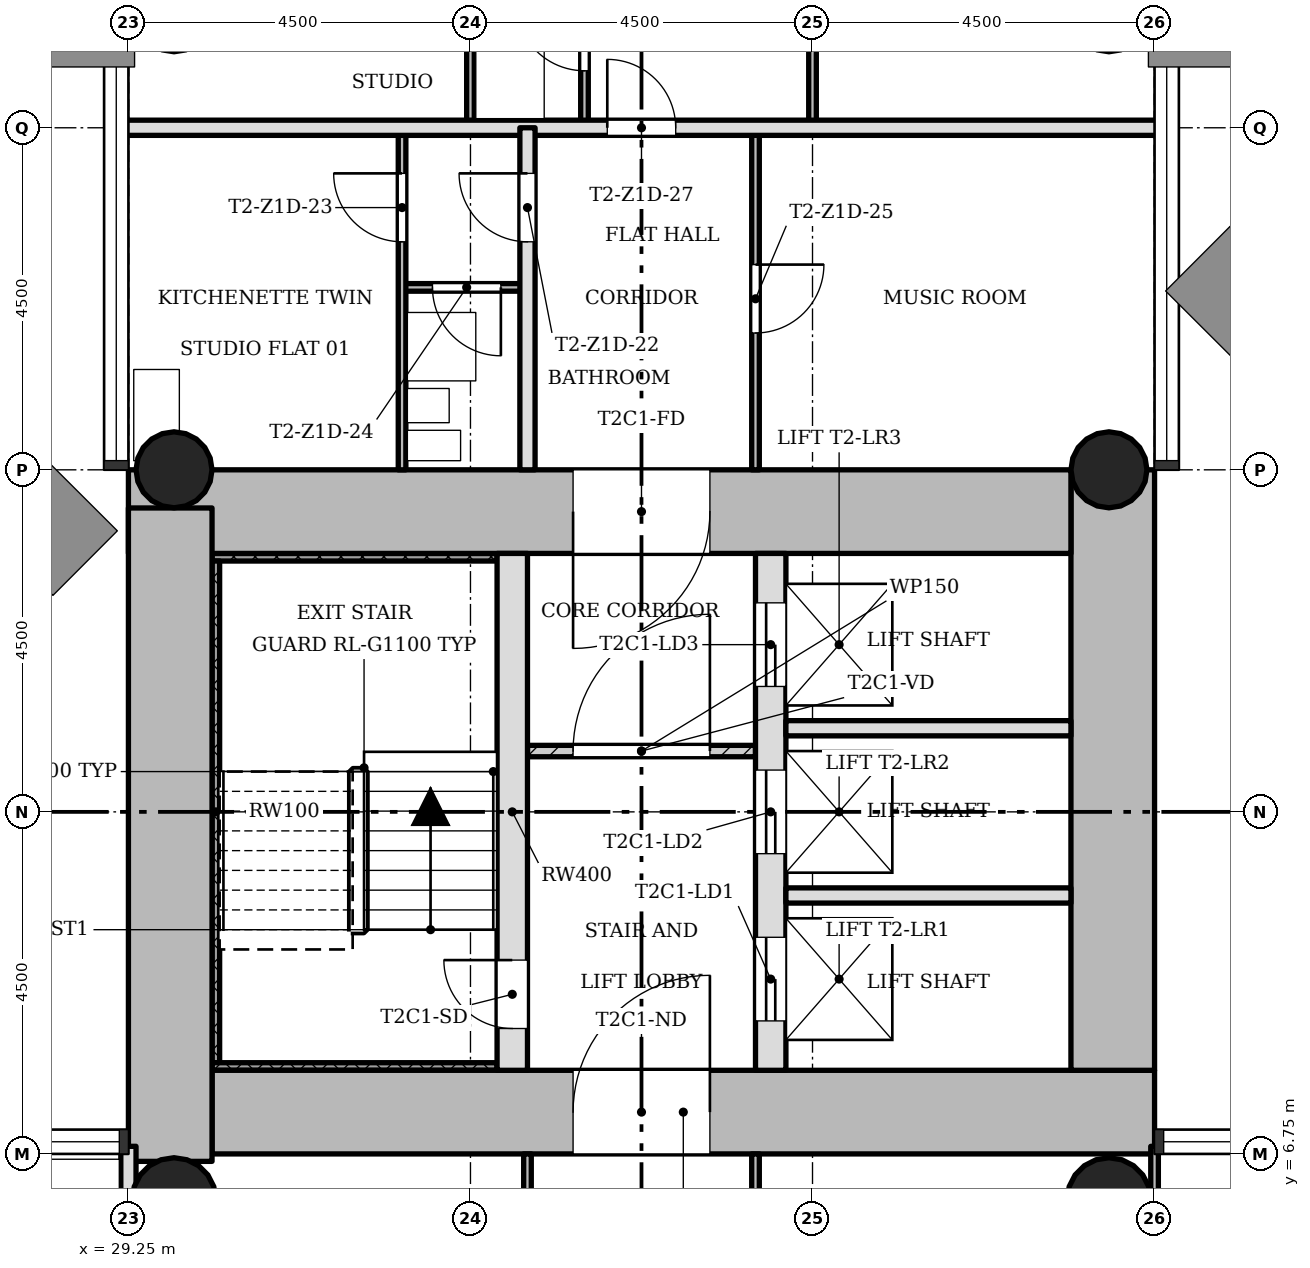
"""IFC4 building model, lengths in metres.
Left out: names, types, materials, properties, quantities, classifications, styles, units other than length and angle.
Written with IfcOpenShell. Run it as: python <this file> out.ifc"""

import sys

from ifc_helpers import new_model, si_unit, direction, frame, frame_2d, origin, origin_2d, place, context, subcontext, project, spatial, rectangle, hollow_circle, extrude, element, fill, save


model = new_model("IFC4")
c1 = context("Model", 3, precision=1e-05, world=origin(), true_north=direction((0.0, 1.0)))
c2 = subcontext(c1, "Body", "Model", "MODEL_VIEW")
j1 = project(units=[si_unit("LENGTHUNIT", "METRE"), si_unit("PLANEANGLEUNIT", "RADIAN")], contexts=[c1])
p1 = place(None, origin())
s1 = spatial("IfcSite", under=j1, at=p1, CompositionType="ELEMENT")
p2 = place(p1, origin())
s2 = spatial("IfcBuilding", under=s1, at=p2, CompositionType="ELEMENT")
p3 = place(p2, frame((0.0, 0.0, 58.5)))
s3 = spatial("IfcBuildingStorey", under=s2, at=p3, CompositionType="ELEMENT", Elevation=58.5)
p4 = place(p3, frame((30.35, 7.3, 0.0), z_axis=(0.0, 0.0, 1.0), x_axis=(1.0, 0.0, 0.0)))
e1 = element("IfcWall", 1, at=p4, inside=s3, PredefinedType="SHEAR", context=c2, shape_type="SweptSolid", body=[
    extrude(rectangle(XDim=12.4, YDim=1.1, at=frame_2d((6.2, 0.0))), origin(), (0.0, 0.0, 1.0), 3.4),
])
p5 = place(p4, frame((4.75, 0.0, 0.0)))
e2 = element("IfcOpeningElement", 2, at=p5, cuts=e1, PredefinedType="OPENING", context=c2, shape_type="SweptSolid", body=[
    extrude(rectangle(XDim=1.8, YDim=2.1, at=frame_2d((0.9, 1.05))), frame((0.0, 0.56, 0.0), z_axis=(0.0, -1.0, 0.0), x_axis=(1.0, 0.0, 0.0)), (0.0, 0.0, 1.0), 1.12),
])
p6 = place(p3, frame((42.2, 7.85, 0.0), z_axis=(0.0, 0.0, 1.0), x_axis=(0.0, 1.0, 0.0)))
e3 = element("IfcWall", 3, at=p6, inside=s3, PredefinedType="SHEAR", context=c2, shape_type="SweptSolid", body=[
    extrude(rectangle(XDim=7.9, YDim=1.1, at=frame_2d((3.95, 0.0))), origin(), (0.0, 0.0, 1.0), 3.4),
])
p7 = place(p3, frame((41.65, 15.2, 0.0), z_axis=(0.0, 0.0, 1.0), x_axis=(-1.0, 0.0, 0.0)))
e4 = element("IfcWall", 4, at=p7, inside=s3, PredefinedType="SHEAR", context=c2, shape_type="SweptSolid", body=[
    extrude(rectangle(XDim=12.4, YDim=1.1, at=frame_2d((6.2, 0.0))), origin(), (0.0, 0.0, 1.0), 3.4),
])
p8 = place(p7, frame((4.75, 0.0, 0.0)))
e5 = element("IfcOpeningElement", 5, at=p8, cuts=e4, PredefinedType="OPENING", context=c2, shape_type="SweptSolid", body=[
    extrude(rectangle(XDim=1.8, YDim=2.1, at=frame_2d((0.9, 1.05))), frame((0.0, 0.56, 0.0), z_axis=(0.0, -1.0, 0.0), x_axis=(1.0, 0.0, 0.0)), (0.0, 0.0, 1.0), 1.12),
])
p9 = place(p3, frame((29.8, 15.248, 0.0), z_axis=(0.0, 0.0, 1.0), x_axis=(0.0, -1.0, 0.0)))
e6 = element("IfcWall", 6, at=p9, inside=s3, PredefinedType="SHEAR", context=c2, shape_type="SweptSolid", body=[
    extrude(rectangle(XDim=8.596, YDim=1.1, at=frame_2d((4.298, 0.0))), origin(), (0.0, 0.0, 1.0), 3.4),
])
p10 = place(p3, frame((34.3, 7.85, 0.0), z_axis=(0.0, 0.0, 1.0), x_axis=(0.0, 1.0, 0.0)))
e7 = element("IfcWall", 7, at=p10, inside=s3, PredefinedType="SHEAR", context=c2, shape_type="SweptSolid", body=[
    extrude(rectangle(XDim=6.8, YDim=0.4, at=frame_2d((3.4, 0.0))), origin(), (0.0, 0.0, 1.0), 3.4),
])
p11 = place(p10, frame((0.55, 0.0, 0.0)))
e8 = element("IfcOpeningElement", 8, at=p11, cuts=e7, PredefinedType="OPENING", context=c2, shape_type="SweptSolid", body=[
    extrude(rectangle(XDim=0.9, YDim=2.1, at=frame_2d((0.45, 1.05))), frame((0.0, 0.21, 0.0), z_axis=(0.0, -1.0, 0.0), x_axis=(1.0, 0.0, 0.0)), (0.0, 0.0, 1.0), 0.42),
])
p12 = place(p3, frame((37.7, 7.85, 0.0), z_axis=(0.0, 0.0, 1.0), x_axis=(0.0, 1.0, 0.0)))
e9 = element("IfcWall", 9, at=p12, inside=s3, PredefinedType="SHEAR", context=c2, shape_type="SweptSolid", body=[
    extrude(rectangle(XDim=6.8, YDim=0.4, at=frame_2d((3.4, 0.0))), origin(), (0.0, 0.0, 1.0), 3.4),
])
p13 = place(p12, frame((0.65, 0.0, 0.0)))
e10 = element("IfcOpeningElement", 10, at=p13, cuts=e9, PredefinedType="OPENING", context=c2, shape_type="SweptSolid", body=[
    extrude(rectangle(XDim=1.1, YDim=2.1, at=frame_2d((0.55, 1.05))), frame((0.0, 0.21, 0.0), z_axis=(0.0, -1.0, 0.0), x_axis=(1.0, 0.0, 0.0)), (0.0, 0.0, 1.0), 0.42),
])
p14 = place(p12, frame((2.85, 0.0, 0.0)))
e11 = element("IfcOpeningElement", 11, at=p14, cuts=e9, PredefinedType="OPENING", context=c2, shape_type="SweptSolid", body=[
    extrude(rectangle(XDim=1.1, YDim=2.1, at=frame_2d((0.55, 1.05))), frame((0.0, 0.21, 0.0), z_axis=(0.0, -1.0, 0.0), x_axis=(1.0, 0.0, 0.0)), (0.0, 0.0, 1.0), 0.42),
])
p15 = place(p12, frame((5.05, 0.0, 0.0)))
e12 = element("IfcOpeningElement", 12, at=p15, cuts=e9, PredefinedType="OPENING", context=c2, shape_type="SweptSolid", body=[
    extrude(rectangle(XDim=1.1, YDim=2.1, at=frame_2d((0.55, 1.05))), frame((0.0, 0.21, 0.0), z_axis=(0.0, -1.0, 0.0), x_axis=(1.0, 0.0, 0.0)), (0.0, 0.0, 1.0), 0.42),
])
for number, where, z_axis, x_axis in (
    (13, (42.15, 15.75, 0.0), (0.0, 0.0, 1.0), (1.0, 0.0, 0.0)),
    (14, (29.85, 15.75, 0.0), (0.0, 0.0, 1.0), (1.0, 0.0, 0.0)),
):
    element("IfcColumn", number, at=place(p3, frame(where, z_axis=z_axis, x_axis=x_axis)), inside=s3, PredefinedType="COLUMN", context=c2, shape_type="SweptSolid", body=[
        extrude(hollow_circle(Radius=0.5, WallThickness=0.036, at=origin_2d()), origin(), (0.0, 0.0, 1.0), 3.4),
    ])
for number, where, z_axis, x_axis in (
    (15, (42.15, 6.15, 0.0), (0.0, 0.0, 1.0), (1.0, 0.0, 0.0)),
    (16, (29.85, 6.15, 0.0), (0.0, 0.0, 1.0), (1.0, 0.0, 0.0)),
):
    element("IfcColumn", number, at=place(p3, frame(where, z_axis=z_axis, x_axis=x_axis)), inside=s3, PredefinedType="COLUMN", context=c2, shape_type="SweptSolid", body=[
        extrude(hollow_circle(Radius=0.55, WallThickness=0.04, at=origin_2d()), origin(), (0.0, 0.0, 1.0), 3.4),
    ])
p16 = place(p3, frame((37.5, 12.05, 0.0), z_axis=(0.0, 0.0, 1.0), x_axis=(-1.0, 0.0, 0.0)))
e17 = element("IfcWall", 17, at=p16, inside=s3, PredefinedType="PARTITIONING", context=c2, shape_type="SweptSolid", body=[
    extrude(rectangle(XDim=3.0, YDim=0.15, at=frame_2d((1.5, 0.0))), origin(), (0.0, 0.0, 1.0), 3.0),
])
p17 = place(p16, frame((0.6, 0.0, 0.0)))
e18 = element("IfcOpeningElement", 18, at=p17, cuts=e17, PredefinedType="OPENING", context=c2, shape_type="SweptSolid", body=[
    extrude(rectangle(XDim=1.8, YDim=2.1, at=frame_2d((0.9, 1.05))), frame((0.0, 0.085, 0.0), z_axis=(0.0, -1.0, 0.0), x_axis=(1.0, 0.0, 0.0)), (0.0, 0.0, 1.0), 0.17),
])
for number, where, z_axis, x_axis in (
    (19, (41.65, 10.15, 0.0), (0.0, 0.0, 1.0), (-1.0, 0.0, 0.0)),
    (20, (41.65, 12.35, 0.0), (0.0, 0.0, 1.0), (-1.0, 0.0, 0.0)),
):
    element("IfcWall", number, at=place(p3, frame(where, z_axis=z_axis, x_axis=x_axis)), inside=s3, PredefinedType="SOLIDWALL", context=c2, shape_type="SweptSolid", body=[
        extrude(rectangle(XDim=3.75, YDim=0.2, at=frame_2d((1.875, 0.0))), origin(), (0.0, 0.0, 1.0), 3.0),
    ])
p18 = place(p3, frame((34.5, 18.15, 0.0), z_axis=(0.0, 0.0, 1.0), x_axis=(-1.0, 0.0, 0.0)))
e21 = element("IfcWall", 21, at=p18, inside=s3, PredefinedType="PARTITIONING", context=c2, shape_type="SweptSolid", body=[
    extrude(rectangle(XDim=1.65, YDim=0.1, at=frame_2d((0.825, 0.0))), origin(), (0.0, 0.0, 1.0), 3.0),
])
p19 = place(p18, frame((0.35, 0.0, 0.0)))
e22 = element("IfcOpeningElement", 22, at=p19, cuts=e21, PredefinedType="OPENING", context=c2, shape_type="SweptSolid", body=[
    extrude(rectangle(XDim=0.9, YDim=2.1, at=frame_2d((0.45, 1.05))), frame((0.0, 0.06, 0.0), z_axis=(0.0, -1.0, 0.0), x_axis=(1.0, 0.0, 0.0)), (0.0, 0.0, 1.0), 0.12),
])
p20 = place(p3, frame((42.85, 20.25, 0.0), z_axis=(0.0, 0.0, 1.0), x_axis=(-1.0, 0.0, 0.0)))
e23 = element("IfcWall", 23, at=p20, inside=s3, PredefinedType="SOLIDWALL", context=c2, shape_type="SweptSolid", body=[
    extrude(rectangle(XDim=13.7, YDim=0.2, at=frame_2d((6.85, 0.0))), origin(), (0.0, 0.0, 1.0), 3.0),
])
p21 = place(p20, frame((6.4, 0.0, 0.0)))
e24 = element("IfcOpeningElement", 24, at=p21, cuts=e23, PredefinedType="OPENING", context=c2, shape_type="SweptSolid", body=[
    extrude(rectangle(XDim=0.9, YDim=2.1, at=frame_2d((0.45, 1.05))), frame((0.0, 0.11, 0.0), z_axis=(0.0, -1.0, 0.0), x_axis=(1.0, 0.0, 0.0)), (0.0, 0.0, 1.0), 0.22),
])
p22 = place(p3, frame((42.75, 0.9, 0.0), z_axis=(0.0, 0.0, 1.0), x_axis=(0.0, 1.0, 0.0)))
e25 = element("IfcWall", 25, at=p22, inside=s3, PredefinedType="PARTITIONING", context=c2, shape_type="SweptSolid", body=[
    extrude(rectangle(XDim=5.95, YDim=0.1, at=frame_2d((2.975, 0.0))), origin(), (0.0, 0.0, 1.0), 3.0),
])
p23 = place(p3, frame((38.25, 20.25, 0.0), z_axis=(0.0, 0.0, 1.0), x_axis=(0.0, 1.0, 0.0)))
e26 = element("IfcWall", 26, at=p23, inside=s3, PredefinedType="PARTITIONING", context=c2, shape_type="SweptSolid", body=[
    extrude(rectangle(XDim=4.6, YDim=0.1, at=frame_2d((2.3, 0.0))), origin(), (0.0, 0.0, 1.0), 3.0),
])
p24 = place(p23, frame((1.8, 0.0, 0.0)))
e27 = element("IfcOpeningElement", 27, at=p24, cuts=e26, PredefinedType="OPENING", context=c2, shape_type="SweptSolid", body=[
    extrude(rectangle(XDim=0.9, YDim=2.1, at=frame_2d((0.45, 1.05))), frame((0.0, 0.06, 0.0), z_axis=(0.0, -1.0, 0.0), x_axis=(1.0, 0.0, 0.0)), (0.0, 0.0, 1.0), 0.12),
])
p25 = place(p3, frame((37.5, 0.9, 0.0), z_axis=(0.0, 0.0, 1.0), x_axis=(0.0, 1.0, 0.0)))
e28 = element("IfcWall", 28, at=p25, inside=s3, PredefinedType="PARTITIONING", context=c2, shape_type="SweptSolid", body=[
    extrude(rectangle(XDim=5.85, YDim=0.1, at=frame_2d((2.925, 0.0))), origin(), (0.0, 0.0, 1.0), 3.0),
])
p26 = place(p25, frame((2.475, 0.0, 0.0)))
e29 = element("IfcOpeningElement", 29, at=p26, cuts=e28, PredefinedType="OPENING", context=c2, shape_type="SweptSolid", body=[
    extrude(rectangle(XDim=0.9, YDim=2.1, at=frame_2d((0.45, 1.05))), frame((0.0, 0.06, 0.0), z_axis=(0.0, -1.0, 0.0), x_axis=(1.0, 0.0, 0.0)), (0.0, 0.0, 1.0), 0.12),
])
p27 = place(p3, frame((37.5, 15.75, 0.0), z_axis=(0.0, 0.0, 1.0), x_axis=(0.0, 1.0, 0.0)))
e30 = element("IfcWall", 30, at=p27, inside=s3, PredefinedType="PARTITIONING", context=c2, shape_type="SweptSolid", body=[
    extrude(rectangle(XDim=4.5, YDim=0.1, at=frame_2d((2.25, 0.0))), origin(), (0.0, 0.0, 1.0), 3.0),
])
p28 = place(p27, frame((1.8, 0.0, 0.0)))
e31 = element("IfcOpeningElement", 31, at=p28, cuts=e30, PredefinedType="OPENING", context=c2, shape_type="SweptSolid", body=[
    extrude(rectangle(XDim=0.9, YDim=2.1, at=frame_2d((0.45, 1.05))), frame((0.0, 0.06, 0.0), z_axis=(0.0, -1.0, 0.0), x_axis=(1.0, 0.0, 0.0)), (0.0, 0.0, 1.0), 0.12),
])
p29 = place(p3, frame((35.25, 20.25, 0.0), z_axis=(0.0, 0.0, 1.0), x_axis=(0.0, 1.0, 0.0)))
e32 = element("IfcWall", 32, at=p29, inside=s3, PredefinedType="PARTITIONING", context=c2, shape_type="SweptSolid", body=[
    extrude(rectangle(XDim=2.4, YDim=0.1, at=frame_2d((1.2, 0.0))), origin(), (0.0, 0.0, 1.0), 3.0),
])
p30 = place(p29, frame((0.75, 0.0, 0.0)))
e33 = element("IfcOpeningElement", 33, at=p30, cuts=e32, PredefinedType="OPENING", context=c2, shape_type="SweptSolid", body=[
    extrude(rectangle(XDim=0.9, YDim=2.1, at=frame_2d((0.45, 1.05))), frame((0.0, 0.06, 0.0), z_axis=(0.0, -1.0, 0.0), x_axis=(1.0, 0.0, 0.0)), (0.0, 0.0, 1.0), 0.12),
])
p31 = place(p3, frame((34.5, 0.9, 0.0), z_axis=(0.0, 0.0, 1.0), x_axis=(0.0, 1.0, 0.0)))
e34 = element("IfcWall", 34, at=p31, inside=s3, PredefinedType="PARTITIONING", context=c2, shape_type="SweptSolid", body=[
    extrude(rectangle(XDim=5.85, YDim=0.1, at=frame_2d((2.925, 0.0))), origin(), (0.0, 0.0, 1.0), 3.0),
])
p32 = place(p31, frame((2.475, 0.0, 0.0)))
e35 = element("IfcOpeningElement", 35, at=p32, cuts=e34, PredefinedType="OPENING", context=c2, shape_type="SweptSolid", body=[
    extrude(rectangle(XDim=0.9, YDim=2.1, at=frame_2d((0.45, 1.05))), frame((0.0, 0.06, 0.0), z_axis=(0.0, -1.0, 0.0), x_axis=(1.0, 0.0, 0.0)), (0.0, 0.0, 1.0), 0.12),
])
p33 = place(p3, frame((34.5, 15.75, 0.0), z_axis=(0.0, 0.0, 1.0), x_axis=(0.0, 1.0, 0.0)))
e36 = element("IfcWall", 36, at=p33, inside=s3, PredefinedType="SOLIDWALL", context=c2, shape_type="SweptSolid", body=[
    extrude(rectangle(XDim=4.5, YDim=0.2, at=frame_2d((2.25, 0.0))), origin(), (0.0, 0.0, 1.0), 3.0),
])
p34 = place(p33, frame((3.0, 0.0, 0.0)))
e37 = element("IfcOpeningElement", 37, at=p34, cuts=e36, PredefinedType="OPENING", context=c2, shape_type="SweptSolid", body=[
    extrude(rectangle(XDim=0.9, YDim=2.1, at=frame_2d((0.45, 1.05))), frame((0.0, 0.11, 0.0), z_axis=(0.0, -1.0, 0.0), x_axis=(1.0, 0.0, 0.0)), (0.0, 0.0, 1.0), 0.22),
])
p35 = place(p3, frame((33.75, 20.25, 0.0), z_axis=(0.0, 0.0, 1.0), x_axis=(0.0, 1.0, 0.0)))
e38 = element("IfcWall", 38, at=p35, inside=s3, PredefinedType="PARTITIONING", context=c2, shape_type="SweptSolid", body=[
    extrude(rectangle(XDim=4.6, YDim=0.1, at=frame_2d((2.3, 0.0))), origin(), (0.0, 0.0, 1.0), 3.0),
])
p36 = place(p35, frame((2.45, 0.0, 0.0)))
e39 = element("IfcOpeningElement", 39, at=p36, cuts=e38, PredefinedType="OPENING", context=c2, shape_type="SweptSolid", body=[
    extrude(rectangle(XDim=0.9, YDim=2.1, at=frame_2d((0.45, 1.05))), frame((0.0, 0.06, 0.0), z_axis=(0.0, -1.0, 0.0), x_axis=(1.0, 0.0, 0.0)), (0.0, 0.0, 1.0), 0.12),
])
p37 = place(p3, frame((32.85, 15.75, 0.0), z_axis=(0.0, 0.0, 1.0), x_axis=(0.0, 1.0, 0.0)))
e40 = element("IfcWall", 40, at=p37, inside=s3, PredefinedType="PARTITIONING", context=c2, shape_type="SweptSolid", body=[
    extrude(rectangle(XDim=4.5, YDim=0.1, at=frame_2d((2.25, 0.0))), origin(), (0.0, 0.0, 1.0), 3.0),
])
p38 = place(p37, frame((3.0, 0.0, 0.0)))
e41 = element("IfcOpeningElement", 41, at=p38, cuts=e40, PredefinedType="OPENING", context=c2, shape_type="SweptSolid", body=[
    extrude(rectangle(XDim=0.9, YDim=2.1, at=frame_2d((0.45, 1.05))), frame((0.0, 0.06, 0.0), z_axis=(0.0, -1.0, 0.0), x_axis=(1.0, 0.0, 0.0)), (0.0, 0.0, 1.0), 0.12),
])
p39 = place(p3, frame((29.25, -6.85, 0.0), z_axis=(0.0, 0.0, 1.0), x_axis=(0.0, 1.0, 0.0)))
e42 = element("IfcWall", 42, at=p39, inside=s3, PredefinedType="SOLIDWALL", context=c2, shape_type="SweptSolid", body=[
    extrude(rectangle(XDim=13.7, YDim=0.2, at=frame_2d((6.85, 0.0))), origin(), (0.0, 0.0, 1.0), 3.0),
])
p40 = place(p39, frame((6.4, 0.0, 0.0)))
e43 = element("IfcOpeningElement", 43, at=p40, cuts=e42, PredefinedType="OPENING", context=c2, shape_type="SweptSolid", body=[
    extrude(rectangle(XDim=0.9, YDim=2.1, at=frame_2d((0.45, 1.05))), frame((0.0, 0.11, 0.0), z_axis=(0.0, -1.0, 0.0), x_axis=(1.0, 0.0, 0.0)), (0.0, 0.0, 1.0), 0.22),
])
p41 = place(p3, frame((34.1, 14.6, 0.0), z_axis=(0.0, 0.0, 1.0), x_axis=(-1.0, 0.0, 0.0)))
e44 = element("IfcWall", 44, at=p41, inside=s3, PredefinedType="SHEAR", context=c2, shape_type="SweptSolid", body=[
    extrude(rectangle(XDim=3.75, YDim=0.1, at=frame_2d((1.875, 0.0))), origin(), (0.0, 0.0, 1.0), 3.4),
])
p42 = place(p3, frame((30.4, 7.95, 0.0), z_axis=(0.0, 0.0, 1.0), x_axis=(0.0, 1.0, 0.0)))
e45 = element("IfcWall", 45, at=p42, inside=s3, PredefinedType="SHEAR", context=c2, shape_type="SweptSolid", body=[
    extrude(rectangle(XDim=6.6, YDim=0.1, at=frame_2d((3.3, 0.0))), origin(), (0.0, 0.0, 1.0), 3.4),
])
p43 = place(p3, frame((34.1, 7.9, 0.0), z_axis=(0.0, 0.0, 1.0), x_axis=(-1.0, 0.0, 0.0)))
e46 = element("IfcWall", 46, at=p43, inside=s3, PredefinedType="SHEAR", context=c2, shape_type="SweptSolid", body=[
    extrude(rectangle(XDim=3.75, YDim=0.1, at=frame_2d((1.875, 0.0))), origin(), (0.0, 0.0, 1.0), 3.4),
])
p44 = place(p17, origin())
e47 = element("IfcDoor", 47, at=p44, inside=s3, OperationType="SINGLE_SWING_LEFT", PredefinedType="DOOR", context=c2, shape_type="SweptSolid", body=[
    extrude(rectangle(XDim=1.8, YDim=2.1, at=frame_2d((0.9, 1.05))), frame((0.0, 0.025, 0.0), z_axis=(0.0, -1.0, 0.0), x_axis=(1.0, 0.0, 0.0)), (0.0, 0.0, 1.0), 0.05),
])
fill(e18, e47)
p45 = place(p34, origin())
e48 = element("IfcDoor", 48, at=p45, inside=s3, OperationType="SINGLE_SWING_LEFT", PredefinedType="DOOR", context=c2, shape_type="SweptSolid", body=[
    extrude(rectangle(XDim=0.9, YDim=2.1, at=frame_2d((0.45, 1.05))), frame((0.0, 0.025, 0.0), z_axis=(0.0, -1.0, 0.0), x_axis=(1.0, 0.0, 0.0)), (0.0, 0.0, 1.0), 0.05),
])
fill(e37, e48)
p46 = place(p38, origin())
e49 = element("IfcDoor", 49, at=p46, inside=s3, OperationType="SINGLE_SWING_LEFT", PredefinedType="DOOR", context=c2, shape_type="SweptSolid", body=[
    extrude(rectangle(XDim=0.9, YDim=2.1, at=frame_2d((0.45, 1.05))), frame((0.0, 0.025, 0.0), z_axis=(0.0, -1.0, 0.0), x_axis=(1.0, 0.0, 0.0)), (0.0, 0.0, 1.0), 0.05),
])
fill(e41, e49)
p47 = place(p19, origin())
e50 = element("IfcDoor", 50, at=p47, inside=s3, OperationType="SINGLE_SWING_RIGHT", PredefinedType="DOOR", context=c2, shape_type="SweptSolid", body=[
    extrude(rectangle(XDim=0.9, YDim=2.1, at=frame_2d((0.45, 1.05))), frame((0.0, 0.025, 0.0), z_axis=(0.0, -1.0, 0.0), x_axis=(1.0, 0.0, 0.0)), (0.0, 0.0, 1.0), 0.05),
])
fill(e22, e50)
p48 = place(p28, origin())
e51 = element("IfcDoor", 51, at=p48, inside=s3, OperationType="SINGLE_SWING_RIGHT", PredefinedType="DOOR", context=c2, shape_type="SweptSolid", body=[
    extrude(rectangle(XDim=0.9, YDim=2.1, at=frame_2d((0.45, 1.05))), frame((0.0, 0.025, 0.0), z_axis=(0.0, -1.0, 0.0), x_axis=(1.0, 0.0, 0.0)), (0.0, 0.0, 1.0), 0.05),
])
fill(e31, e51)
p49 = place(p30, origin())
e52 = element("IfcDoor", 52, at=p49, inside=s3, OperationType="SINGLE_SWING_LEFT", PredefinedType="DOOR", context=c2, shape_type="SweptSolid", body=[
    extrude(rectangle(XDim=0.9, YDim=2.1, at=frame_2d((0.45, 1.05))), frame((0.0, 0.025, 0.0), z_axis=(0.0, -1.0, 0.0), x_axis=(1.0, 0.0, 0.0)), (0.0, 0.0, 1.0), 0.05),
])
fill(e33, e52)
p50 = place(p21, origin())
e53 = element("IfcDoor", 53, at=p50, inside=s3, OperationType="SINGLE_SWING_RIGHT", PredefinedType="DOOR", context=c2, shape_type="SweptSolid", body=[
    extrude(rectangle(XDim=0.9, YDim=2.1, at=frame_2d((0.45, 1.05))), frame((0.0, 0.025, 0.0), z_axis=(0.0, -1.0, 0.0), x_axis=(1.0, 0.0, 0.0)), (0.0, 0.0, 1.0), 0.05),
])
fill(e24, e53)
p51 = place(p11, origin())
e54 = element("IfcDoor", 54, at=p51, inside=s3, OperationType="SINGLE_SWING_LEFT", PredefinedType="DOOR", context=c2, shape_type="SweptSolid", body=[
    extrude(rectangle(XDim=0.9, YDim=2.1, at=frame_2d((0.45, 1.05))), frame((0.0, 0.025, 0.0), z_axis=(0.0, -1.0, 0.0), x_axis=(1.0, 0.0, 0.0)), (0.0, 0.0, 1.0), 0.05),
])
fill(e8, e54)
p52 = place(p13, origin())
e55 = element("IfcDoor", 55, at=p52, inside=s3, OperationType="SLIDING_TO_LEFT", PredefinedType="DOOR", context=c2, shape_type="SweptSolid", body=[
    extrude(rectangle(XDim=1.1, YDim=2.1, at=frame_2d((0.55, 1.05))), frame((0.0, 0.025, 0.0), z_axis=(0.0, -1.0, 0.0), x_axis=(1.0, 0.0, 0.0)), (0.0, 0.0, 1.0), 0.05),
])
fill(e10, e55)
p53 = place(p14, origin())
e56 = element("IfcDoor", 56, at=p53, inside=s3, OperationType="SLIDING_TO_LEFT", PredefinedType="DOOR", context=c2, shape_type="SweptSolid", body=[
    extrude(rectangle(XDim=1.1, YDim=2.1, at=frame_2d((0.55, 1.05))), frame((0.0, 0.025, 0.0), z_axis=(0.0, -1.0, 0.0), x_axis=(1.0, 0.0, 0.0)), (0.0, 0.0, 1.0), 0.05),
])
fill(e11, e56)
p54 = place(p15, origin())
e57 = element("IfcDoor", 57, at=p54, inside=s3, OperationType="SLIDING_TO_LEFT", PredefinedType="DOOR", context=c2, shape_type="SweptSolid", body=[
    extrude(rectangle(XDim=1.1, YDim=2.1, at=frame_2d((0.55, 1.05))), frame((0.0, 0.025, 0.0), z_axis=(0.0, -1.0, 0.0), x_axis=(1.0, 0.0, 0.0)), (0.0, 0.0, 1.0), 0.05),
])
fill(e12, e57)
p55 = place(p5, origin())
e58 = element("IfcDoor", 58, at=p55, inside=s3, OperationType="SINGLE_SWING_LEFT", PredefinedType="DOOR", context=c2, shape_type="SweptSolid", body=[
    extrude(rectangle(XDim=1.8, YDim=2.1, at=frame_2d((0.9, 1.05))), frame((0.0, 0.025, 0.0), z_axis=(0.0, -1.0, 0.0), x_axis=(1.0, 0.0, 0.0)), (0.0, 0.0, 1.0), 0.05),
])
fill(e2, e58)
p56 = place(p8, origin())
e59 = element("IfcDoor", 59, at=p56, inside=s3, OperationType="SINGLE_SWING_LEFT", PredefinedType="DOOR", context=c2, shape_type="SweptSolid", body=[
    extrude(rectangle(XDim=1.8, YDim=2.1, at=frame_2d((0.9, 1.05))), frame((0.0, 0.025, 0.0), z_axis=(0.0, -1.0, 0.0), x_axis=(1.0, 0.0, 0.0)), (0.0, 0.0, 1.0), 0.05),
])
fill(e5, e59)
save(model, sys.argv[1])
